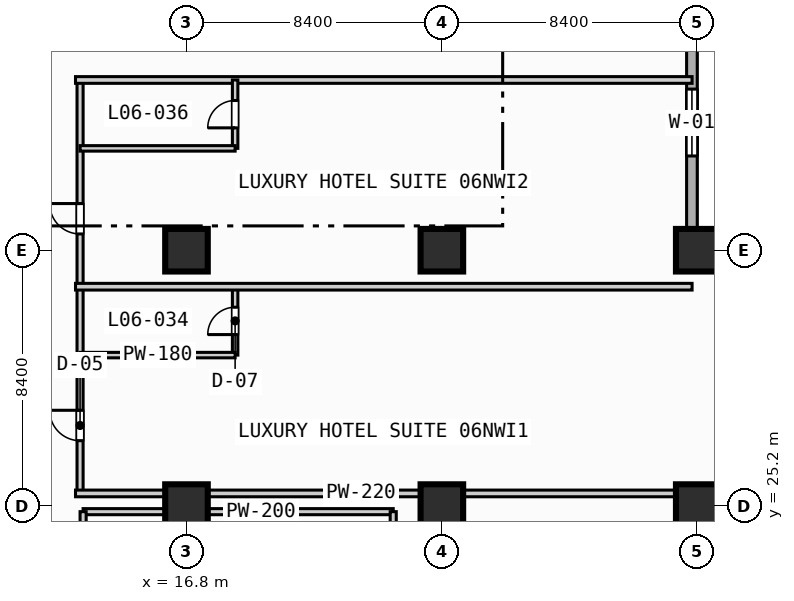
"""IFC4 building model, lengths in metres.
Left out: names, types, materials, properties, quantities, classifications, styles, units other than length and angle.
Written with IfcOpenShell. Run it as: python <this file> out.ifc"""

import sys

from ifc_helpers import new_model, si_unit, direction, frame, frame_2d, origin, origin_2d, place, context, subcontext, project, spatial, rectangle, extrude, element, fill, save


model = new_model("IFC4")
c1 = context("Model", 3, precision=1e-05, world=origin(), true_north=direction((0.0, 1.0)))
c2 = subcontext(c1, "Body", "Model", "MODEL_VIEW")
j1 = project(units=[si_unit("LENGTHUNIT", "METRE"), si_unit("PLANEANGLEUNIT", "RADIAN")], contexts=[c1])
p1 = place(None, origin())
s1 = spatial("IfcSite", under=j1, at=p1, CompositionType="ELEMENT")
p2 = place(p1, origin())
s2 = spatial("IfcBuilding", under=s1, at=p2, CompositionType="ELEMENT")
p3 = place(p2, frame((0.0, 0.0, 32.0)))
s3 = spatial("IfcBuildingStorey", under=s2, at=p3, CompositionType="ELEMENT", Elevation=32.0)
for number, where, z_axis, x_axis in (
    (1, (16.8, 25.2, 0.0), (0.0, 0.0, 1.0), (1.0, 0.0, 0.0)),
    (2, (16.8, 33.6, 0.0), (0.0, 0.0, 1.0), (1.0, 0.0, 0.0)),
    (3, (25.2, 25.2, 0.0), (0.0, 0.0, 1.0), (1.0, 0.0, 0.0)),
    (4, (25.2, 33.6, 0.0), (0.0, 0.0, 1.0), (1.0, 0.0, 0.0)),
    (5, (33.6, 25.2, 0.0), (0.0, 0.0, 1.0), (1.0, 0.0, 0.0)),
    (6, (33.6, 33.6, 0.0), (0.0, 0.0, 1.0), (1.0, 0.0, 0.0)),
):
    element("IfcColumn", number, at=place(p3, frame(where, z_axis=z_axis, x_axis=x_axis)), inside=s3, PredefinedType="COLUMN", context=c2, shape_type="SweptSolid", body=[
        extrude(rectangle(XDim=1.4, YDim=1.4, at=origin_2d()), origin(), (0.0, 0.0, 1.0), 3.8),
    ])
p4 = place(p3, frame((33.425, 89.225, 0.0), z_axis=(0.0, 0.0, 1.0), x_axis=(0.0, -1.0, 0.0)))
e7 = element("IfcWall", 7, at=p4, inside=s3, PredefinedType="STANDARD", context=c2, shape_type="SweptSolid", body=[
    extrude(rectangle(XDim=55.8, YDim=0.35, at=frame_2d((27.9, 0.0))), origin(), (0.0, 0.0, 1.0), 3.55),
])
p5 = place(p4, frame((50.325, 0.0, 0.85)))
e8 = element("IfcOpeningElement", 8, at=p5, cuts=e7, PredefinedType="OPENING", context=c2, shape_type="SweptSolid", body=[
    extrude(rectangle(XDim=2.2, YDim=1.8, at=frame_2d((1.1, 0.9))), frame((0.0, 0.185, 0.0), z_axis=(0.0, -1.0, 0.0), x_axis=(1.0, 0.0, 0.0)), (0.0, 0.0, 1.0), 0.37),
])
p6 = place(p3, frame((33.425, 33.425, 0.0), z_axis=(0.0, 0.0, 1.0), x_axis=(1.0, 0.0, 0.0)))
e9 = element("IfcWall", 9, at=p6, inside=s3, PredefinedType="STANDARD", context=c2, shape_type="SweptSolid", body=[
    extrude(rectangle(XDim=55.8, YDim=0.35, at=frame_2d((27.9, 0.0))), origin(), (0.0, 0.0, 1.0), 3.55),
])
p7 = place(p6, frame((12.075, 0.0, 0.0)))
e10 = element("IfcOpeningElement", 10, at=p7, cuts=e9, PredefinedType="OPENING", context=c2, shape_type="SweptSolid", body=[
    extrude(rectangle(XDim=1.4, YDim=2.2, at=frame_2d((0.7, 1.1))), frame((0.0, 0.185, 0.0), z_axis=(0.0, -1.0, 0.0), x_axis=(1.0, 0.0, 0.0)), (0.0, 0.0, 1.0), 0.37),
])
p8 = place(p3, frame((18.6, 13.4, 0.0), z_axis=(0.0, 0.0, 1.0), x_axis=(0.0, 1.0, 0.0)))
e11 = element("IfcWall", 11, at=p8, inside=s3, PredefinedType="PARTITIONING", context=c2, shape_type="SweptSolid", body=[
    extrude(rectangle(XDim=11.6, YDim=0.16, at=frame_2d((5.8, 0.0))), origin(), (0.0, 0.0, 1.0), 3.55),
])
p9 = place(p3, frame((13.4, 25.0, 0.0), z_axis=(0.0, 0.0, 1.0), x_axis=(1.0, 0.0, 0.0)))
e12 = element("IfcWall", 12, at=p9, inside=s3, PredefinedType="PARTITIONING", context=c2, shape_type="SweptSolid", body=[
    extrude(rectangle(XDim=10.2, YDim=0.2, at=frame_2d((5.1, 0.0))), origin(), (0.0, 0.0, 1.0), 2.8),
])
for number, where, z_axis, x_axis in (
    (13, (13.4, 13.4, 0.0), (0.0, 0.0, 1.0), (0.0, 1.0, 0.0)),
    (14, (23.6, 13.4, 0.0), (0.0, 0.0, 1.0), (0.0, 1.0, 0.0)),
):
    element("IfcWall", number, at=place(p3, frame(where, z_axis=z_axis, x_axis=x_axis)), inside=s3, PredefinedType="PARTITIONING", context=c2, shape_type="SweptSolid", body=[
        extrude(rectangle(XDim=11.6, YDim=0.2, at=frame_2d((5.8, 0.0))), origin(), (0.0, 0.0, 1.0), 3.55),
    ])
p10 = place(p3, frame((13.3, 25.6, 0.0), z_axis=(0.0, 0.0, 1.0), x_axis=(0.0, 1.0, 0.0)))
e15 = element("IfcWall", 15, at=p10, inside=s3, PredefinedType="PARTITIONING", context=c2, shape_type="SweptSolid", body=[
    extrude(rectangle(XDim=13.6, YDim=0.2, at=frame_2d((6.8, 0.0))), origin(), (0.0, 0.0, 1.0), 3.55),
])
p11 = place(p10, frame((1.735, 0.0, 0.0)))
e16 = element("IfcOpeningElement", 16, at=p11, cuts=e15, PredefinedType="OPENING", context=c2, shape_type="SweptSolid", body=[
    extrude(rectangle(XDim=1.0, YDim=2.15, at=frame_2d((0.5, 1.075))), frame((0.0, 0.11, 0.0), z_axis=(0.0, -1.0, 0.0), x_axis=(1.0, 0.0, 0.0)), (0.0, 0.0, 1.0), 0.22),
])
p12 = place(p10, frame((8.535, 0.0, 0.0)))
e17 = element("IfcOpeningElement", 17, at=p12, cuts=e15, PredefinedType="OPENING", context=c2, shape_type="SweptSolid", body=[
    extrude(rectangle(XDim=1.0, YDim=2.15, at=frame_2d((0.5, 1.075))), frame((0.0, 0.11, 0.0), z_axis=(0.0, -1.0, 0.0), x_axis=(1.0, 0.0, 0.0)), (0.0, 0.0, 1.0), 0.22),
])
p13 = place(p3, frame((13.15, 25.6, 0.0), z_axis=(0.0, 0.0, 1.0), x_axis=(1.0, 0.0, 0.0)))
e18 = element("IfcWall", 18, at=p13, inside=s3, PredefinedType="PARTITIONING", context=c2, shape_type="SweptSolid", body=[
    extrude(rectangle(XDim=20.28, YDim=0.22, at=frame_2d((10.14, 0.0))), origin(), (0.0, 0.0, 1.0), 3.55),
])
p14 = place(p3, frame((18.4, 30.15, 0.0), z_axis=(0.0, 0.0, 1.0), x_axis=(0.0, 1.0, 0.0)))
e19 = element("IfcWall", 19, at=p14, inside=s3, PredefinedType="PLUMBINGWALL", context=c2, shape_type="SweptSolid", body=[
    extrude(rectangle(XDim=2.25, YDim=0.18, at=frame_2d((1.125, 0.0))), origin(), (0.0, 0.0, 1.0), 3.55),
])
p15 = place(p14, frame((0.675, 0.0, 0.0)))
e20 = element("IfcOpeningElement", 20, at=p15, cuts=e19, PredefinedType="OPENING", context=c2, shape_type="SweptSolid", body=[
    extrude(rectangle(XDim=0.9, YDim=2.1, at=frame_2d((0.45, 1.05))), frame((0.0, 0.1, 0.0), z_axis=(0.0, -1.0, 0.0), x_axis=(1.0, 0.0, 0.0)), (0.0, 0.0, 1.0), 0.2),
])
p16 = place(p3, frame((13.3, 30.15, 0.0), z_axis=(0.0, 0.0, 1.0), x_axis=(1.0, 0.0, 0.0)))
e21 = element("IfcWall", 21, at=p16, inside=s3, PredefinedType="PLUMBINGWALL", context=c2, shape_type="SweptSolid", body=[
    extrude(rectangle(XDim=5.1, YDim=0.18, at=frame_2d((2.55, 0.0))), origin(), (0.0, 0.0, 1.0), 3.55),
])
for number, where, z_axis, x_axis in (
    (22, (13.15, 32.4, 0.0), (0.0, 0.0, 1.0), (1.0, 0.0, 0.0)),
    (23, (13.15, 39.2, 0.0), (0.0, 0.0, 1.0), (1.0, 0.0, 0.0)),
):
    element("IfcWall", number, at=place(p3, frame(where, z_axis=z_axis, x_axis=x_axis)), inside=s3, PredefinedType="PARTITIONING", context=c2, shape_type="SweptSolid", body=[
        extrude(rectangle(XDim=20.28, YDim=0.22, at=frame_2d((10.14, 0.0))), origin(), (0.0, 0.0, 1.0), 3.55),
    ])
p17 = place(p3, frame((18.4, 36.95, 0.0), z_axis=(0.0, 0.0, 1.0), x_axis=(0.0, 1.0, 0.0)))
e24 = element("IfcWall", 24, at=p17, inside=s3, PredefinedType="PLUMBINGWALL", context=c2, shape_type="SweptSolid", body=[
    extrude(rectangle(XDim=2.25, YDim=0.18, at=frame_2d((1.125, 0.0))), origin(), (0.0, 0.0, 1.0), 3.55),
])
p18 = place(p17, frame((0.675, 0.0, 0.0)))
e25 = element("IfcOpeningElement", 25, at=p18, cuts=e24, PredefinedType="OPENING", context=c2, shape_type="SweptSolid", body=[
    extrude(rectangle(XDim=0.9, YDim=2.1, at=frame_2d((0.45, 1.05))), frame((0.0, 0.1, 0.0), z_axis=(0.0, -1.0, 0.0), x_axis=(1.0, 0.0, 0.0)), (0.0, 0.0, 1.0), 0.2),
])
p19 = place(p3, frame((13.3, 36.95, 0.0), z_axis=(0.0, 0.0, 1.0), x_axis=(1.0, 0.0, 0.0)))
e26 = element("IfcWall", 26, at=p19, inside=s3, PredefinedType="PLUMBINGWALL", context=c2, shape_type="SweptSolid", body=[
    extrude(rectangle(XDim=5.1, YDim=0.18, at=frame_2d((2.55, 0.0))), origin(), (0.0, 0.0, 1.0), 3.55),
])
p20 = place(p5, origin())
e27 = element("IfcWindow", 27, at=p20, inside=s3, PartitioningType="SINGLE_PANEL", PredefinedType="WINDOW", context=c2, shape_type="SweptSolid", body=[
    extrude(rectangle(XDim=2.2, YDim=1.8, at=frame_2d((1.1, 0.9))), frame((0.0, 0.03, 0.0), z_axis=(0.0, -1.0, 0.0), x_axis=(1.0, 0.0, 0.0)), (0.0, 0.0, 1.0), 0.06),
])
fill(e8, e27)
p21 = place(p11, origin())
e28 = element("IfcDoor", 28, at=p21, inside=s3, OperationType="SINGLE_SWING_RIGHT", PredefinedType="DOOR", context=c2, shape_type="SweptSolid", body=[
    extrude(rectangle(XDim=1.0, YDim=2.15, at=frame_2d((0.5, 1.075))), frame((0.0, 0.025, 0.0), z_axis=(0.0, -1.0, 0.0), x_axis=(1.0, 0.0, 0.0)), (0.0, 0.0, 1.0), 0.05),
])
fill(e16, e28)
p22 = place(p12, origin())
e29 = element("IfcDoor", 29, at=p22, inside=s3, OperationType="SINGLE_SWING_RIGHT", PredefinedType="DOOR", context=c2, shape_type="SweptSolid", body=[
    extrude(rectangle(XDim=1.0, YDim=2.15, at=frame_2d((0.5, 1.075))), frame((0.0, 0.025, 0.0), z_axis=(0.0, -1.0, 0.0), x_axis=(1.0, 0.0, 0.0)), (0.0, 0.0, 1.0), 0.05),
])
fill(e17, e29)
p23 = place(p15, origin())
e30 = element("IfcDoor", 30, at=p23, inside=s3, OperationType="SINGLE_SWING_LEFT", PredefinedType="DOOR", context=c2, shape_type="SweptSolid", body=[
    extrude(rectangle(XDim=0.9, YDim=2.1, at=frame_2d((0.45, 1.05))), frame((0.0, 0.025, 0.0), z_axis=(0.0, -1.0, 0.0), x_axis=(1.0, 0.0, 0.0)), (0.0, 0.0, 1.0), 0.05),
])
fill(e20, e30)
p24 = place(p18, origin())
e31 = element("IfcDoor", 31, at=p24, inside=s3, OperationType="SINGLE_SWING_LEFT", PredefinedType="DOOR", context=c2, shape_type="SweptSolid", body=[
    extrude(rectangle(XDim=0.9, YDim=2.1, at=frame_2d((0.45, 1.05))), frame((0.0, 0.025, 0.0), z_axis=(0.0, -1.0, 0.0), x_axis=(1.0, 0.0, 0.0)), (0.0, 0.0, 1.0), 0.05),
])
fill(e25, e31)
save(model, sys.argv[1])
